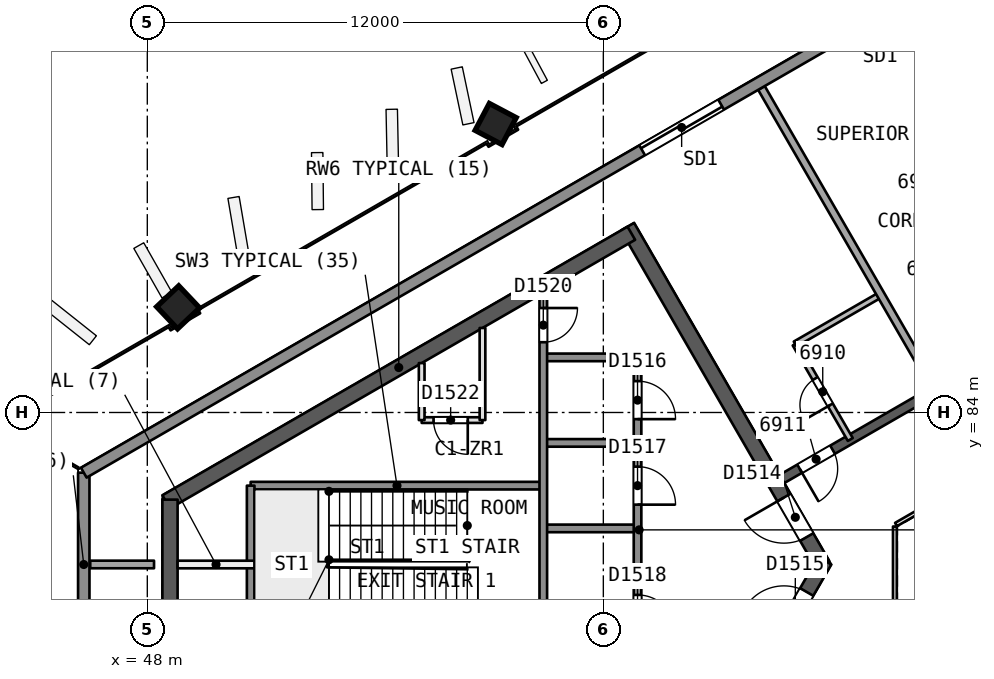
"""IFC4 building model, lengths in metres.
Left out: names, types, materials, properties, quantities, classifications, styles, units other than length and angle.
Written with IfcOpenShell. Run it as: python <this file> out.ifc"""

import sys

from ifc_helpers import new_model, si_unit, direction, frame, frame_2d, origin, origin_2d, place, context, subcontext, project, spatial, rectangle, extrude, element, fill, save


model = new_model("IFC4")
c1 = context("Model", 3, precision=1e-05, world=origin(), true_north=direction((0.0, 1.0)))
c2 = subcontext(c1, "Body", "Model", "MODEL_VIEW")
j1 = project(units=[si_unit("LENGTHUNIT", "METRE"), si_unit("PLANEANGLEUNIT", "RADIAN")], contexts=[c1])
p1 = place(None, origin())
s1 = spatial("IfcSite", under=j1, at=p1, CompositionType="ELEMENT")
p2 = place(p1, origin())
s2 = spatial("IfcBuilding", under=s1, at=p2, CompositionType="ELEMENT")
p3 = place(p2, frame((0.0, 0.0, 281.2)))
s3 = spatial("IfcBuildingStorey", under=s2, at=p3, CompositionType="ELEMENT", Elevation=281.2)
p4 = place(p3, frame((65.769, 80.0, 0.0), z_axis=(0.0, 0.0, 1.0), x_axis=(-0.50000177223, 0.866024380585, 0.0)))
e1 = element("IfcWall", 1, at=p4, inside=s3, PredefinedType="SHEAR", context=c2, shape_type="SweptSolid", body=[
    extrude(rectangle(XDim=10.265, YDim=0.4, at=frame_2d((5.132, 0.0))), origin(), (0.0, 0.0, 1.0), 3.7),
])
p5 = place(p4, frame((0.834, 0.0, 0.0)))
e2 = element("IfcOpeningElement", 2, at=p5, cuts=e1, PredefinedType="OPENING", context=c2, shape_type="SweptSolid", body=[
    extrude(rectangle(XDim=1.2, YDim=2.1, at=frame_2d((0.6, 1.05))), frame((0.0, 0.21, 0.0), z_axis=(0.0, -1.0, 0.0), x_axis=(1.0, 0.0, 0.0)), (0.0, 0.0, 1.0), 0.421),
])
p6 = place(p3, frame((60.737, 88.716, 0.0), z_axis=(0.0, 0.0, 1.0), x_axis=(-0.866028812667, -0.499994095595, 0.0)))
e3 = element("IfcWall", 3, at=p6, inside=s3, PredefinedType="SHEAR", context=c2, shape_type="SweptSolid", body=[
    extrude(rectangle(XDim=14.134, YDim=0.4, at=frame_2d((7.067, 0.0))), origin(), (0.0, 0.0, 1.0), 3.7),
])
p7 = place(p3, frame((48.597, 81.707, 0.0), z_axis=(0.0, 0.0, 1.0), x_axis=(0.0, -1.0, 0.0)))
e4 = element("IfcWall", 4, at=p7, inside=s3, PredefinedType="SHEAR", context=c2, shape_type="SweptSolid", body=[
    extrude(rectangle(XDim=3.53, YDim=0.4, at=frame_2d((1.765, 0.0))), origin(), (0.0, 0.0, 1.0), 3.7),
])
p8 = place(p3, frame((60.737, 71.284, 0.0), z_axis=(0.0, 0.0, 1.0), x_axis=(0.50000547566, 0.866022242388, 0.0)))
e5 = element("IfcWall", 5, at=p8, inside=s3, PredefinedType="SHEAR", context=c2, shape_type="SweptSolid", body=[
    extrude(rectangle(XDim=10.18, YDim=0.4, at=frame_2d((5.09, 0.0))), origin(), (0.0, 0.0, 1.0), 3.7),
])
p9 = place(p8, frame((8.03, 0.0, 0.0)))
e6 = element("IfcOpeningElement", 6, at=p9, cuts=e5, PredefinedType="OPENING", context=c2, shape_type="SweptSolid", body=[
    extrude(rectangle(XDim=1.2, YDim=2.1, at=frame_2d((0.6, 1.05))), frame((0.0, 0.21, 0.0), z_axis=(0.0, -1.0, 0.0), x_axis=(1.0, 0.0, 0.0)), (0.0, 0.0, 1.0), 0.421),
])
p10 = place(p3, frame((78.2, 90.046, 0.0), z_axis=(0.0, 0.0, 1.0), x_axis=(-0.866026492143, -0.499998114903, 0.0)))
e7 = element("IfcWall", 7, at=p10, inside=s3, PredefinedType="SHEAR", context=c2, shape_type="SweptSolid", body=[
    extrude(rectangle(XDim=15.588, YDim=0.25, at=frame_2d((7.794, 0.0))), origin(), (0.0, 0.0, 1.0), 3.3),
])
p11 = place(p10, frame((3.138, 0.0, 0.0)))
e8 = element("IfcOpeningElement", 8, at=p11, cuts=e7, PredefinedType="OPENING", context=c2, shape_type="SweptSolid", body=[
    extrude(rectangle(XDim=1.0, YDim=2.1, at=frame_2d((0.5, 1.05))), frame((0.0, 0.135, 0.0), z_axis=(0.0, -1.0, 0.0), x_axis=(1.0, 0.0, 0.0)), (0.0, 0.0, 1.0), 0.271),
])
p12 = place(p10, frame((8.594, 0.0, 0.0)))
e9 = element("IfcOpeningElement", 9, at=p12, cuts=e7, PredefinedType="OPENING", context=c2, shape_type="SweptSolid", body=[
    extrude(rectangle(XDim=1.0, YDim=2.1, at=frame_2d((0.5, 1.05))), frame((0.0, 0.135, 0.0), z_axis=(0.0, -1.0, 0.0), x_axis=(1.0, 0.0, 0.0)), (0.0, 0.0, 1.0), 0.271),
])
p13 = place(p10, frame((14.05, 0.0, 0.0)))
e10 = element("IfcOpeningElement", 10, at=p13, cuts=e7, PredefinedType="OPENING", context=c2, shape_type="SweptSolid", body=[
    extrude(rectangle(XDim=1.0, YDim=2.1, at=frame_2d((0.5, 1.05))), frame((0.0, 0.135, 0.0), z_axis=(0.0, -1.0, 0.0), x_axis=(1.0, 0.0, 0.0)), (0.0, 0.0, 1.0), 0.271),
])
p14 = place(p3, frame((57.144, 91.605, 0.0), z_axis=(0.019328501455, -0.012204002625, 0.999738701537), x_axis=(-0.498082427135, 0.866894093285, 0.020212046084)))
e11 = element("IfcColumn", 11, at=p14, inside=s3, PredefinedType="COLUMN", context=c2, shape_type="SweptSolid", body=[
    extrude(rectangle(XDim=0.8, YDim=0.8, at=origin_2d()), origin(), (0.0, 0.0, 1.0), 3.701),
])
p15 = place(p3, frame((48.777, 86.775, 0.0), z_axis=(0.028559101991, -0.006859460986, 0.999568569678), x_axis=(-0.49850561578, 0.866651314562, 0.020190344332)))
e12 = element("IfcColumn", 12, at=p15, inside=s3, PredefinedType="COLUMN", context=c2, shape_type="SweptSolid", body=[
    extrude(rectangle(XDim=0.8, YDim=0.8, at=origin_2d()), origin(), (0.0, 0.0, 1.0), 3.702),
])
p16 = place(p3, frame((64.16, 92.54, 0.0), z_axis=(0.0, 0.0, 1.0), x_axis=(0.500006393711, -0.866021712342, 0.0)))
e13 = element("IfcWall", 13, at=p16, inside=s3, PredefinedType="PARTITIONING", context=c2, shape_type="SweptSolid", body=[
    extrude(rectangle(XDim=9.18, YDim=0.2, at=frame_2d((4.59, 0.0))), origin(), (0.0, 0.0, 1.0), 3.3),
])
p17 = place(p3, frame((66.498, 83.29, 0.0), z_axis=(0.0, 0.0, 1.0), x_axis=(-0.499987231761, 0.866032775405, 0.0)))
e14 = element("IfcWall", 14, at=p17, inside=s3, PredefinedType="PARTITIONING", context=c2, shape_type="SweptSolid", body=[
    extrude(rectangle(XDim=2.9, YDim=0.15, at=frame_2d((1.45, 0.0))), origin(), (0.0, 0.0, 1.0), 3.3),
])
p18 = place(p17, frame((1.05, 0.0, 0.0)))
e15 = element("IfcOpeningElement", 15, at=p18, cuts=e14, PredefinedType="OPENING", context=c2, shape_type="SweptSolid", body=[
    extrude(rectangle(XDim=0.8, YDim=2.1, at=frame_2d((0.4, 1.05))), frame((0.0, 0.085, 0.0), z_axis=(0.0, -1.0, 0.0), x_axis=(1.0, 0.0, 0.0)), (0.0, 0.0, 1.0), 0.171),
])
p19 = place(p3, frame((65.048, 85.802, 0.0), z_axis=(0.0, 0.0, 1.0), x_axis=(0.866062058628, 0.499936506574, 0.0)))
e16 = element("IfcWall", 16, at=p19, inside=s3, PredefinedType="PARTITIONING", context=c2, shape_type="SweptSolid", body=[
    extrude(rectangle(XDim=2.6, YDim=0.15, at=frame_2d((1.3, 0.0))), origin(), (0.0, 0.0, 1.0), 3.3),
])
p20 = place(p3, frame((46.498, 80.001, 0.0), z_axis=(0.0, 0.0, 1.0), x_axis=(1.0, 0.0, 0.0)))
e17 = element("IfcWall", 17, at=p20, inside=s3, PredefinedType="PARTITIONING", context=c2, shape_type="SweptSolid", body=[
    extrude(rectangle(XDim=1.679, YDim=0.2, at=frame_2d((0.839, 0.0))), origin(), (0.0, 0.0, 1.0), 3.3),
])
p21 = place(p3, frame((46.328, 77.584, 0.0), z_axis=(0.0, 0.0, 1.0), x_axis=(0.0, 1.0, 0.0)))
e18 = element("IfcWall", 18, at=p21, inside=s3, PredefinedType="SOLIDWALL", context=c2, shape_type="SweptSolid", body=[
    extrude(rectangle(XDim=4.833, YDim=0.3, at=frame_2d((2.416, 0.0))), origin(), (0.0, 0.0, 1.0), 3.3),
])
p22 = place(p3, frame((46.328, 82.416, 0.0), z_axis=(0.0, 0.0, 1.0), x_axis=(0.866024406396, 0.500001727524, 0.0)))
e19 = element("IfcWall", 19, at=p22, inside=s3, PredefinedType="SOLIDWALL", context=c2, shape_type="SweptSolid", body=[
    extrude(rectangle(XDim=47.245, YDim=0.3, at=frame_2d((23.623, 0.0))), origin(), (0.0, 0.0, 1.0), 3.3),
])
p23 = place(p22, frame((16.967, 0.0, 0.0)))
e20 = element("IfcOpeningElement", 20, at=p23, cuts=e19, PredefinedType="OPENING", context=c2, shape_type="SweptSolid", body=[
    extrude(rectangle(XDim=2.4, YDim=2.4, at=frame_2d((1.2, 1.2))), frame((0.0, 0.161, 0.0), z_axis=(0.0, -1.0, 0.0), x_axis=(1.0, 0.0, 0.0)), (0.0, 0.0, 1.0), 0.321),
])
p24 = place(p22, frame((27.878, 0.0, 0.0)))
e21 = element("IfcOpeningElement", 21, at=p24, cuts=e19, PredefinedType="OPENING", context=c2, shape_type="SweptSolid", body=[
    extrude(rectangle(XDim=2.4, YDim=2.4, at=frame_2d((1.2, 1.2))), frame((0.0, 0.161, 0.0), z_axis=(0.0, -1.0, 0.0), x_axis=(1.0, 0.0, 0.0)), (0.0, 0.0, 1.0), 0.321),
])
p25 = place(p22, frame((22.422, 0.0, 0.0)))
e22 = element("IfcOpeningElement", 22, at=p25, cuts=e19, PredefinedType="OPENING", context=c2, shape_type="SweptSolid", body=[
    extrude(rectangle(XDim=2.4, YDim=2.4, at=frame_2d((1.2, 1.2))), frame((0.0, 0.161, 0.0), z_axis=(0.0, -1.0, 0.0), x_axis=(1.0, 0.0, 0.0)), (0.0, 0.0, 1.0), 0.321),
])
p26 = place(p3, frame((60.9, 85.45, 0.0), z_axis=(0.0, 0.0, 1.0), x_axis=(-1.0, 0.0, 0.0)))
e23 = element("IfcWall", 23, at=p26, inside=s3, PredefinedType="SOLIDWALL", context=c2, shape_type="SweptSolid", body=[
    extrude(rectangle(XDim=2.48, YDim=0.2, at=frame_2d((1.24, 0.0))), origin(), (0.0, 0.0, 1.0), 3.3),
])
p27 = place(p3, frame((56.82, 83.8, 0.0), z_axis=(0.0, 0.0, 1.0), x_axis=(-1.0, 0.0, 0.0)))
e24 = element("IfcWall", 24, at=p27, inside=s3, PredefinedType="PARTITIONING", context=c2, shape_type="SweptSolid", body=[
    extrude(rectangle(XDim=1.6, YDim=0.15, at=frame_2d((0.8, 0.0))), origin(), (0.0, 0.0, 1.0), 3.3),
])
p28 = place(p27, frame((0.387, 0.0, 0.0)))
e25 = element("IfcOpeningElement", 25, at=p28, cuts=e24, PredefinedType="OPENING", context=c2, shape_type="SweptSolid", body=[
    extrude(rectangle(XDim=0.9, YDim=2.1, at=frame_2d((0.45, 1.05))), frame((0.0, 0.085, 0.0), z_axis=(0.0, -1.0, 0.0), x_axis=(1.0, 0.0, 0.0)), (0.0, 0.0, 1.0), 0.171),
])
p29 = place(p3, frame((60.9, 83.2, 0.0), z_axis=(0.0, 0.0, 1.0), x_axis=(-1.0, 0.0, 0.0)))
e26 = element("IfcWall", 26, at=p29, inside=s3, PredefinedType="SOLIDWALL", context=c2, shape_type="SweptSolid", body=[
    extrude(rectangle(XDim=2.48, YDim=0.2, at=frame_2d((1.24, 0.0))), origin(), (0.0, 0.0, 1.0), 3.3),
])
p30 = place(p3, frame((58.42, 82.075, 0.0), z_axis=(0.0, 0.0, 1.0), x_axis=(-1.0, 0.0, 0.0)))
e27 = element("IfcWall", 27, at=p30, inside=s3, PredefinedType="SOLIDWALL", context=c2, shape_type="SweptSolid", body=[
    extrude(rectangle(XDim=7.7, YDim=0.2, at=frame_2d((3.85, 0.0))), origin(), (0.0, 0.0, 1.0), 3.3),
])
p31 = place(p3, frame((60.9, 80.95, 0.0), z_axis=(0.0, 0.0, 1.0), x_axis=(-1.0, 0.0, 0.0)))
e28 = element("IfcWall", 28, at=p31, inside=s3, PredefinedType="SOLIDWALL", context=c2, shape_type="SweptSolid", body=[
    extrude(rectangle(XDim=2.48, YDim=0.2, at=frame_2d((1.24, 0.0))), origin(), (0.0, 0.0, 1.0), 3.3),
])
p32 = place(p3, frame((50.82, 80.0, 0.0), z_axis=(0.0, 0.0, 1.0), x_axis=(-1.0, 0.0, 0.0)))
e29 = element("IfcWall", 29, at=p32, inside=s3, PredefinedType="PARTITIONING", context=c2, shape_type="SweptSolid", body=[
    extrude(rectangle(XDim=2.023, YDim=0.2, at=frame_2d((1.012, 0.0))), origin(), (0.0, 0.0, 1.0), 3.3),
])
p33 = place(p3, frame((60.9, 85.45, 0.0), z_axis=(0.0, 0.0, 1.0), x_axis=(0.0, -1.0, 0.0)))
e30 = element("IfcWall", 30, at=p33, inside=s3, PredefinedType="SOLIDWALL", context=c2, shape_type="SweptSolid", body=[
    extrude(rectangle(XDim=10.9, YDim=0.2, at=frame_2d((5.45, 0.0))), origin(), (0.0, 0.0, 1.0), 3.3),
])
p34 = place(p33, frame((0.625, 0.0, 0.0)))
e31 = element("IfcOpeningElement", 31, at=p34, cuts=e30, PredefinedType="OPENING", context=c2, shape_type="SweptSolid", body=[
    extrude(rectangle(XDim=1.0, YDim=2.1, at=frame_2d((0.5, 1.05))), frame((0.0, 0.11, 0.0), z_axis=(0.0, -1.0, 0.0), x_axis=(1.0, 0.0, 0.0)), (0.0, 0.0, 1.0), 0.221),
])
p35 = place(p33, frame((2.875, 0.0, 0.0)))
e32 = element("IfcOpeningElement", 32, at=p35, cuts=e30, PredefinedType="OPENING", context=c2, shape_type="SweptSolid", body=[
    extrude(rectangle(XDim=1.0, YDim=2.1, at=frame_2d((0.5, 1.05))), frame((0.0, 0.11, 0.0), z_axis=(0.0, -1.0, 0.0), x_axis=(1.0, 0.0, 0.0)), (0.0, 0.0, 1.0), 0.221),
])
p36 = place(p33, frame((6.25, 0.0, 0.0)))
e33 = element("IfcOpeningElement", 33, at=p36, cuts=e30, PredefinedType="OPENING", context=c2, shape_type="SweptSolid", body=[
    extrude(rectangle(XDim=1.0, YDim=2.1, at=frame_2d((0.5, 1.05))), frame((0.0, 0.11, 0.0), z_axis=(0.0, -1.0, 0.0), x_axis=(1.0, 0.0, 0.0)), (0.0, 0.0, 1.0), 0.221),
])
p37 = place(p3, frame((58.42, 87.148, 0.0), z_axis=(0.0, 0.0, 1.0), x_axis=(0.0, -1.0, 0.0)))
e34 = element("IfcWall", 34, at=p37, inside=s3, PredefinedType="SOLIDWALL", context=c2, shape_type="SweptSolid", body=[
    extrude(rectangle(XDim=10.698, YDim=0.2, at=frame_2d((5.349, 0.0))), origin(), (0.0, 0.0, 1.0), 3.3),
])
p38 = place(p37, frame((0.399, 0.0, 0.0)))
e35 = element("IfcOpeningElement", 35, at=p38, cuts=e34, PredefinedType="OPENING", context=c2, shape_type="SweptSolid", body=[
    extrude(rectangle(XDim=0.9, YDim=2.1, at=frame_2d((0.45, 1.05))), frame((0.0, 0.11, 0.0), z_axis=(0.0, -1.0, 0.0), x_axis=(1.0, 0.0, 0.0)), (0.0, 0.0, 1.0), 0.221),
])
p39 = place(p3, frame((56.82, 86.224, 0.0), z_axis=(0.0, 0.0, 1.0), x_axis=(0.0, -1.0, 0.0)))
e36 = element("IfcWall", 36, at=p39, inside=s3, PredefinedType="PARTITIONING", context=c2, shape_type="SweptSolid", body=[
    extrude(rectangle(XDim=2.424, YDim=0.15, at=frame_2d((1.212, 0.0))), origin(), (0.0, 0.0, 1.0), 3.3),
])
p40 = place(p3, frame((55.22, 85.3, 0.0), z_axis=(0.0, 0.0, 1.0), x_axis=(0.0, -1.0, 0.0)))
e37 = element("IfcWall", 37, at=p40, inside=s3, PredefinedType="PARTITIONING", context=c2, shape_type="SweptSolid", body=[
    extrude(rectangle(XDim=1.5, YDim=0.15, at=frame_2d((0.75, 0.0))), origin(), (0.0, 0.0, 1.0), 3.3),
])
p41 = place(p3, frame((50.72, 82.075, 0.0), z_axis=(0.0, 0.0, 1.0), x_axis=(0.0, -1.0, 0.0)))
e38 = element("IfcWall", 38, at=p41, inside=s3, PredefinedType="SOLIDWALL", context=c2, shape_type="SweptSolid", body=[
    extrude(rectangle(XDim=4.15, YDim=0.2, at=frame_2d((2.075, 0.0))), origin(), (0.0, 0.0, 1.0), 3.3),
])
p42 = place(p3, frame((77.738, 86.846, 0.0), z_axis=(0.0, 0.0, 1.0), x_axis=(-0.866026658274, -0.499997827154, 0.0)))
e39 = element("IfcWall", 39, at=p42, inside=s3, PredefinedType="PARTITIONING", context=c2, shape_type="SweptSolid", body=[
    extrude(rectangle(XDim=11.588, YDim=0.1, at=frame_2d((5.794, 0.0))), origin(), (0.0, 0.0, 1.0), 3.3),
])
p43 = place(p3, frame((67.672, 81.0, 0.0), z_axis=(0.0, 0.0, 1.0), x_axis=(0.0, -1.0, 0.0)))
e40 = element("IfcWall", 40, at=p43, inside=s3, PredefinedType="PARTITIONING", context=c2, shape_type="SweptSolid", body=[
    extrude(rectangle(XDim=2.0, YDim=0.1, at=frame_2d((1.0, 0.0))), origin(), (0.0, 0.0, 1.0), 3.3),
])
p44 = place(p18, origin())
e41 = element("IfcDoor", 41, at=p44, inside=s3, OperationType="SINGLE_SWING_LEFT", PredefinedType="NOTDEFINED", context=c2, shape_type="SweptSolid", body=[
    extrude(rectangle(XDim=0.8, YDim=2.1, at=frame_2d((0.4, 1.05))), frame((0.0, 0.025, 0.0), z_axis=(0.0, -1.0, 0.0), x_axis=(1.0, 0.0, 0.0)), (0.0, 0.0, 1.0), 0.05),
])
fill(e15, e41)
p45 = place(p13, origin())
e42 = element("IfcDoor", 42, at=p45, inside=s3, OperationType="SINGLE_SWING_RIGHT", PredefinedType="NOTDEFINED", context=c2, shape_type="SweptSolid", body=[
    extrude(rectangle(XDim=1.0, YDim=2.1, at=frame_2d((0.5, 1.05))), frame((0.0, 0.025, 0.0), z_axis=(0.0, -1.0, 0.0), x_axis=(1.0, 0.0, 0.0)), (0.0, 0.0, 1.0), 0.05),
])
fill(e10, e42)
p46 = place(p23, origin())
e43 = element("IfcDoor", 43, at=p46, inside=s3, OperationType="SLIDING_TO_LEFT", PredefinedType="NOTDEFINED", context=c2, shape_type="SweptSolid", body=[
    extrude(rectangle(XDim=2.4, YDim=2.4, at=frame_2d((1.2, 1.2))), frame((0.0, 0.025, 0.0), z_axis=(0.0, -1.0, 0.0), x_axis=(1.0, 0.0, 0.0)), (0.0, 0.0, 1.0), 0.05),
])
fill(e20, e43)
p47 = place(p5, origin())
e44 = element("IfcDoor", 44, at=p47, inside=s3, OperationType="SINGLE_SWING_RIGHT", PredefinedType="NOTDEFINED", context=c2, shape_type="SweptSolid", body=[
    extrude(rectangle(XDim=1.2, YDim=2.1, at=frame_2d((0.6, 1.05))), frame((0.0, 0.025, 0.0), z_axis=(0.0, -1.0, 0.0), x_axis=(1.0, 0.0, 0.0)), (0.0, 0.0, 1.0), 0.05),
])
fill(e2, e44)
p48 = place(p9, origin())
e45 = element("IfcDoor", 45, at=p48, inside=s3, OperationType="SINGLE_SWING_LEFT", PredefinedType="NOTDEFINED", context=c2, shape_type="SweptSolid", body=[
    extrude(rectangle(XDim=1.2, YDim=2.1, at=frame_2d((0.6, 1.05))), frame((0.0, 0.025, 0.0), z_axis=(0.0, -1.0, 0.0), x_axis=(1.0, 0.0, 0.0)), (0.0, 0.0, 1.0), 0.05),
])
fill(e6, e45)
p49 = place(p34, origin())
e46 = element("IfcDoor", 46, at=p49, inside=s3, OperationType="SINGLE_SWING_RIGHT", PredefinedType="NOTDEFINED", context=c2, shape_type="SweptSolid", body=[
    extrude(rectangle(XDim=1.0, YDim=2.1, at=frame_2d((0.5, 1.05))), frame((0.0, 0.025, 0.0), z_axis=(0.0, -1.0, 0.0), x_axis=(1.0, 0.0, 0.0)), (0.0, 0.0, 1.0), 0.05),
])
fill(e31, e46)
p50 = place(p35, origin())
e47 = element("IfcDoor", 47, at=p50, inside=s3, OperationType="SINGLE_SWING_RIGHT", PredefinedType="NOTDEFINED", context=c2, shape_type="SweptSolid", body=[
    extrude(rectangle(XDim=1.0, YDim=2.1, at=frame_2d((0.5, 1.05))), frame((0.0, 0.025, 0.0), z_axis=(0.0, -1.0, 0.0), x_axis=(1.0, 0.0, 0.0)), (0.0, 0.0, 1.0), 0.05),
])
fill(e32, e47)
p51 = place(p36, origin())
e48 = element("IfcDoor", 48, at=p51, inside=s3, OperationType="SINGLE_SWING_RIGHT", PredefinedType="NOTDEFINED", context=c2, shape_type="SweptSolid", body=[
    extrude(rectangle(XDim=1.0, YDim=2.1, at=frame_2d((0.5, 1.05))), frame((0.0, 0.025, 0.0), z_axis=(0.0, -1.0, 0.0), x_axis=(1.0, 0.0, 0.0)), (0.0, 0.0, 1.0), 0.05),
])
fill(e33, e48)
p52 = place(p38, origin())
e49 = element("IfcDoor", 49, at=p52, inside=s3, OperationType="SINGLE_SWING_LEFT", PredefinedType="NOTDEFINED", context=c2, shape_type="SweptSolid", body=[
    extrude(rectangle(XDim=0.9, YDim=2.1, at=frame_2d((0.45, 1.05))), frame((0.0, 0.025, 0.0), z_axis=(0.0, -1.0, 0.0), x_axis=(1.0, 0.0, 0.0)), (0.0, 0.0, 1.0), 0.05),
])
fill(e35, e49)
p53 = place(p28, origin())
e50 = element("IfcDoor", 50, at=p53, inside=s3, OperationType="SINGLE_SWING_LEFT", PredefinedType="NOTDEFINED", context=c2, shape_type="SweptSolid", body=[
    extrude(rectangle(XDim=0.9, YDim=2.1, at=frame_2d((0.45, 1.05))), frame((0.0, 0.025, 0.0), z_axis=(0.0, -1.0, 0.0), x_axis=(1.0, 0.0, 0.0)), (0.0, 0.0, 1.0), 0.05),
])
fill(e25, e50)
save(model, sys.argv[1])
